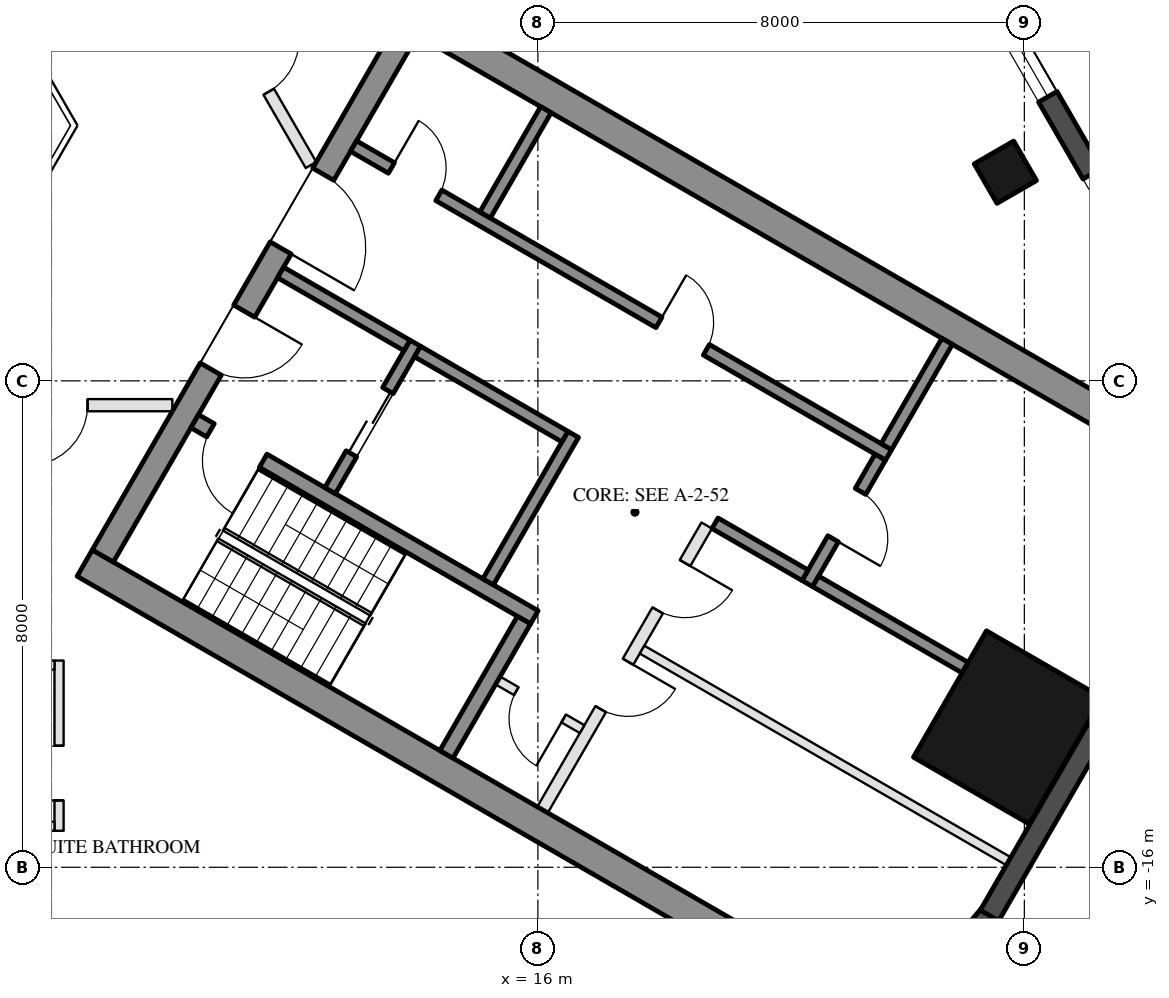
"""IFC4 building model, lengths in metres.
Left out: names, types, materials, properties, quantities, classifications, styles, units other than length and angle.
Written with IfcOpenShell. Run it as: python <this file> out.ifc"""

import sys

from ifc_helpers import new_model, si_unit, direction, frame, frame_2d, origin, origin_2d, place, context, subcontext, project, spatial, rectangle, hollow_rectangle, extrude, element, fill, save


model = new_model("IFC4")
c1 = context("Model", 3, precision=1e-05, world=origin(), true_north=direction((0.0, 1.0)))
c2 = subcontext(c1, "Body", "Model", "MODEL_VIEW")
j1 = project(units=[si_unit("LENGTHUNIT", "METRE"), si_unit("PLANEANGLEUNIT", "RADIAN")], contexts=[c1])
p1 = place(None, origin())
s1 = spatial("IfcSite", under=j1, at=p1, CompositionType="ELEMENT")
p2 = place(p1, origin())
s2 = spatial("IfcBuilding", under=s1, at=p2, CompositionType="ELEMENT")
p3 = place(p2, frame((0.0, 0.0, 224.3)))
s3 = spatial("IfcBuildingStorey", under=s2, at=p3, CompositionType="ELEMENT", Elevation=224.3)
p4 = place(p3, frame((23.688, -4.568, 0.0), z_axis=(0.0, 0.0, 1.0), x_axis=(-0.5, 0.866025403784, 0.0)))
e1 = element("IfcColumn", 1, at=p4, inside=s3, PredefinedType="COLUMN", context=c2, shape_type="SweptSolid", body=[
    extrude(hollow_rectangle(XDim=0.75, YDim=0.75, WallThickness=0.035, at=origin_2d()), origin(), (0.0, 0.0, 1.0), 3.7),
])
p5 = place(p3, frame((23.729, -13.7, 0.0), z_axis=(0.0, 0.0, 1.0), x_axis=(0.5, 0.866025403784, 0.0)))
e2 = element("IfcColumn", 2, at=p5, inside=s3, PredefinedType="COLUMN", context=c2, shape_type="SweptSolid", body=[
    extrude(hollow_rectangle(XDim=2.4, YDim=2.2, WallThickness=0.06, at=origin_2d()), origin(), (0.0, 0.0, 1.0), 3.7),
])
p6 = place(p3, frame((22.217, -18.231, 0.0), z_axis=(0.0, 0.0, 1.0), x_axis=(0.642733291068, 0.76609001857, 0.0)))
e3 = element("IfcWall", 3, at=p6, inside=s3, PredefinedType="SOLIDWALL", context=c2, shape_type="SweptSolid", body=[
    extrude(rectangle(XDim=1.91, YDim=0.35, at=frame_2d((0.955, 0.0))), origin(), (0.0, 0.0, 1.0), 3.55),
])
p7 = place(p3, frame((23.427, -16.792, 0.0), z_axis=(0.0, 0.0, 1.0), x_axis=(0.500018773155, 0.866014564827, 0.0)))
e4 = element("IfcWall", 4, at=p7, inside=s3, PredefinedType="SOLIDWALL", context=c2, shape_type="SweptSolid", body=[
    extrude(rectangle(XDim=5.658, YDim=0.35, at=frame_2d((2.829, 0.0))), origin(), (0.0, 0.0, 1.0), 3.55),
])
p8 = place(p3, frame((26.257, -6.567, 0.0), z_axis=(0.0, 0.0, 1.0), x_axis=(-0.500023526245, 0.866011820475, 0.0)))
e5 = element("IfcWall", 5, at=p8, inside=s3, PredefinedType="SOLIDWALL", context=c2, shape_type="SweptSolid", body=[
    extrude(rectangle(XDim=11.816, YDim=0.35, at=frame_2d((5.908, 0.0))), origin(), (0.0, 0.0, 1.0), 3.55),
])
p9 = place(p8, frame((0.38, 0.0, 0.3)))
e6 = element("IfcOpeningElement", 6, at=p9, cuts=e5, PredefinedType="OPENING", context=c2, shape_type="SweptSolid", body=[
    extrude(rectangle(XDim=1.9, YDim=2.65, at=frame_2d((0.95, 1.325))), frame((0.0, 0.185, 0.0), z_axis=(0.0, -1.0, 0.0), x_axis=(1.0, 0.0, 0.0)), (0.0, 0.0, 1.0), 0.37),
])
p10 = place(p8, frame((7.791, 0.0, 0.0)))
e7 = element("IfcOpeningElement", 7, at=p10, cuts=e5, PredefinedType="OPENING", context=c2, shape_type="SweptSolid", body=[
    extrude(rectangle(XDim=2.4, YDim=2.4, at=frame_2d((1.2, 1.2))), frame((0.0, 0.185, 0.0), z_axis=(0.0, -1.0, 0.0), x_axis=(1.0, 0.0, 0.0)), (0.0, 0.0, 1.0), 0.37),
])
p11 = place(p8, frame((3.741, 0.0, 0.3)))
e8 = element("IfcOpeningElement", 8, at=p11, cuts=e5, PredefinedType="OPENING", context=c2, shape_type="SweptSolid", body=[
    extrude(rectangle(XDim=1.7, YDim=2.65, at=frame_2d((0.85, 1.325))), frame((0.0, 0.185, 0.0), z_axis=(0.0, -1.0, 0.0), x_axis=(1.0, 0.0, 0.0)), (0.0, 0.0, 1.0), 0.37),
])
p12 = place(p8, frame((5.741, 0.0, 0.3)))
e9 = element("IfcOpeningElement", 9, at=p12, cuts=e5, PredefinedType="OPENING", context=c2, shape_type="SweptSolid", body=[
    extrude(rectangle(XDim=1.7, YDim=2.65, at=frame_2d((0.85, 1.325))), frame((0.0, 0.185, 0.0), z_axis=(0.0, -1.0, 0.0), x_axis=(1.0, 0.0, 0.0)), (0.0, 0.0, 1.0), 0.37),
])
for number, where, z_axis, x_axis in (
    (10, (8.547, -10.997, 0.0), (0.0, 0.0, 1.0), (0.866, -0.5, 0.0)),
    (11, (13.797, -1.903, 0.0), (0.0, 0.0, 1.0), (0.866, -0.5, 0.0)),
):
    element("IfcWall", number, at=place(p3, frame(where, z_axis=z_axis, x_axis=x_axis)), inside=s3, PredefinedType="SHEAR", context=c2, shape_type="SweptSolid", body=[
        extrude(rectangle(XDim=14.837, YDim=0.5, at=frame_2d((7.418, 0.0))), origin(), (0.0, 0.0, 1.0), 3.5),
    ])
p13 = place(p3, frame((8.845, -10.88, 0.0), z_axis=(0.0, 0.0, 1.0), x_axis=(0.500004234368, 0.866022959057, 0.0)))
e12 = element("IfcWall", 12, at=p13, inside=s3, PredefinedType="SHEAR", context=c2, shape_type="SweptSolid", body=[
    extrude(rectangle(XDim=10.0, YDim=0.4, at=frame_2d((5.0, 0.0))), origin(), (0.0, 0.0, 1.0), 3.5),
])
p14 = place(p13, frame((3.55, 0.0, 0.0)))
e13 = element("IfcOpeningElement", 13, at=p14, cuts=e12, PredefinedType="OPENING", context=c2, shape_type="SweptSolid", body=[
    extrude(rectangle(XDim=1.1, YDim=2.1, at=frame_2d((0.55, 1.05))), frame((0.0, 0.21, 0.0), z_axis=(0.0, -1.0, 0.0), x_axis=(1.0, 0.0, 0.0)), (0.0, 0.0, 1.0), 0.42),
])
p15 = place(p13, frame((5.85, 0.0, 0.0)))
e14 = element("IfcOpeningElement", 14, at=p15, cuts=e12, PredefinedType="OPENING", context=c2, shape_type="SweptSolid", body=[
    extrude(rectangle(XDim=1.4, YDim=2.1, at=frame_2d((0.7, 1.05))), frame((0.0, 0.21, 0.0), z_axis=(0.0, -1.0, 0.0), x_axis=(1.0, 0.0, 0.0)), (0.0, 0.0, 1.0), 0.42),
])
p16 = place(p3, frame((10.356, -8.664, 0.0), z_axis=(0.0, 0.0, 1.0), x_axis=(0.866028629588, -0.499994412703, 0.0)))
e15 = element("IfcWall", 15, at=p16, inside=s3, PredefinedType="SHEAR", context=c2, shape_type="SweptSolid", body=[
    extrude(rectangle(XDim=6.45, YDim=0.25, at=frame_2d((3.225, 0.0))), origin(), (0.0, 0.0, 1.0), 3.5),
])
p17 = place(p16, frame((0.3, 0.0, 0.0)))
e16 = element("IfcOpeningElement", 16, at=p17, cuts=e15, PredefinedType="OPENING", context=c2, shape_type="SweptSolid", body=[
    extrude(rectangle(XDim=1.0, YDim=2.1, at=frame_2d((0.5, 1.05))), frame((0.0, 0.135, 0.0), z_axis=(0.0, -1.0, 0.0), x_axis=(1.0, 0.0, 0.0)), (0.0, 0.0, 1.0), 0.27),
])
p18 = place(p3, frame((14.496, -14.143, 0.0), z_axis=(0.0, 0.0, 1.0), x_axis=(0.500062241894, 0.865989465428, 0.0)))
e17 = element("IfcWall", 17, at=p18, inside=s3, PredefinedType="SHEAR", context=c2, shape_type="SweptSolid", body=[
    extrude(rectangle(XDim=2.55, YDim=0.25, at=frame_2d((1.275, 0.0))), origin(), (0.0, 0.0, 1.0), 3.5),
])
p19 = place(p3, frame((15.181, -11.305, 0.0), z_axis=(0.0, 0.0, 1.0), x_axis=(0.49994636267, 0.866056369097, 0.0)))
e18 = element("IfcWall", 18, at=p19, inside=s3, PredefinedType="SHEAR", context=c2, shape_type="SweptSolid", body=[
    extrude(rectangle(XDim=2.8, YDim=0.2, at=frame_2d((1.4, 0.0))), origin(), (0.0, 0.0, 1.0), 3.5),
])
p20 = place(p3, frame((12.583, -9.805, 0.0), z_axis=(0.0, 0.0, 1.0), x_axis=(0.49994636267, 0.866056369097, 0.0)))
e19 = element("IfcWall", 19, at=p20, inside=s3, PredefinedType="SHEAR", context=c2, shape_type="SweptSolid", body=[
    extrude(rectangle(XDim=2.8, YDim=0.2, at=frame_2d((1.4, 0.0))), origin(), (0.0, 0.0, 1.0), 3.5),
])
p21 = place(p20, frame((0.7, 0.0, 0.0)))
e20 = element("IfcOpeningElement", 20, at=p21, cuts=e19, PredefinedType="OPENING", context=c2, shape_type="SweptSolid", body=[
    extrude(rectangle(XDim=1.2, YDim=2.1, at=frame_2d((0.6, 1.05))), frame((0.0, 0.11, 0.0), z_axis=(0.0, -1.0, 0.0), x_axis=(1.0, 0.0, 0.0)), (0.0, 0.0, 1.0), 0.22),
])
p22 = place(p3, frame((11.768, -6.217, 0.0), z_axis=(0.0, 0.0, 1.0), x_axis=(0.866050077142, -0.499957262057, 0.0)))
e21 = element("IfcWall", 21, at=p22, inside=s3, PredefinedType="SHEAR", context=c2, shape_type="SweptSolid", body=[
    extrude(rectangle(XDim=2.4, YDim=0.2, at=frame_2d((1.2, 0.0))), origin(), (0.0, 0.0, 1.0), 3.5),
])
p23 = place(p3, frame((14.02, -7.517, 0.0), z_axis=(0.0, 0.0, 1.0), x_axis=(0.866034573852, -0.49998411664, 0.0)))
e22 = element("IfcWall", 22, at=p23, inside=s3, PredefinedType="SHEAR", context=c2, shape_type="SweptSolid", body=[
    extrude(rectangle(XDim=2.8, YDim=0.2, at=frame_2d((1.4, 0.0))), origin(), (0.0, 0.0, 1.0), 3.5),
])
p24 = place(p3, frame((12.968, -4.138, 0.0), z_axis=(0.0, 0.0, 1.0), x_axis=(0.866028328073, -0.49999493495, 0.0)))
e23 = element("IfcWall", 23, at=p24, inside=s3, PredefinedType="SHEAR", context=c2, shape_type="SweptSolid", body=[
    extrude(rectangle(XDim=10.16, YDim=0.2, at=frame_2d((5.08, 0.0))), origin(), (0.0, 0.0, 1.0), 3.5),
])
p25 = place(p24, frame((0.72, 0.0, 0.0)))
e24 = element("IfcOpeningElement", 24, at=p25, cuts=e23, PredefinedType="OPENING", context=c2, shape_type="SweptSolid", body=[
    extrude(rectangle(XDim=0.9, YDim=2.1, at=frame_2d((0.45, 1.05))), frame((0.0, 0.11, 0.0), z_axis=(0.0, -1.0, 0.0), x_axis=(1.0, 0.0, 0.0)), (0.0, 0.0, 1.0), 0.22),
])
p26 = place(p24, frame((5.8, 0.0, 0.0)))
e25 = element("IfcOpeningElement", 25, at=p26, cuts=e23, PredefinedType="OPENING", context=c2, shape_type="SweptSolid", body=[
    extrude(rectangle(XDim=0.9, YDim=2.1, at=frame_2d((0.45, 1.05))), frame((0.0, 0.11, 0.0), z_axis=(0.0, -1.0, 0.0), x_axis=(1.0, 0.0, 0.0)), (0.0, 0.0, 1.0), 0.22),
])
p27 = place(p3, frame((20.43, -11.333, 0.0), z_axis=(0.0, 0.0, 1.0), x_axis=(0.500001309137, 0.866024647952, 0.0)))
e26 = element("IfcWall", 26, at=p27, inside=s3, PredefinedType="SHEAR", context=c2, shape_type="SweptSolid", body=[
    extrude(rectangle(XDim=2.4, YDim=0.2, at=frame_2d((1.2, 0.0))), origin(), (0.0, 0.0, 1.0), 3.5),
])
p28 = place(p27, frame((0.85, 0.0, 0.0)))
e27 = element("IfcOpeningElement", 27, at=p28, cuts=e26, PredefinedType="OPENING", context=c2, shape_type="SweptSolid", body=[
    extrude(rectangle(XDim=0.9, YDim=2.1, at=frame_2d((0.45, 1.05))), frame((0.0, 0.11, 0.0), z_axis=(0.0, -1.0, 0.0), x_axis=(1.0, 0.0, 0.0)), (0.0, 0.0, 1.0), 0.22),
])
p29 = place(p3, frame((18.913, -10.342, 0.0), z_axis=(0.0, 0.0, 1.0), x_axis=(0.866038183914, -0.499977863513, 0.0)))
e28 = element("IfcWall", 28, at=p29, inside=s3, PredefinedType="SHEAR", context=c2, shape_type="SweptSolid", body=[
    extrude(rectangle(XDim=1.71, YDim=0.2, at=frame_2d((0.855, 0.0))), origin(), (0.0, 0.0, 1.0), 3.5),
])
for number, where, z_axis, x_axis in (
    (29, (15.131, -5.272, 0.0), (0.0, 0.0, 1.0), (0.5, 0.866, 0.0)),
    (30, (21.73, -9.082, 0.0), (0.0, 0.0, 1.0), (0.5, 0.866, 0.0)),
):
    element("IfcWall", number, at=place(p3, frame(where, z_axis=z_axis, x_axis=x_axis)), inside=s3, PredefinedType="SHEAR", context=c2, shape_type="SweptSolid", body=[
        extrude(rectangle(XDim=2.0, YDim=0.2, at=frame_2d((1.0, 0.0))), origin(), (0.0, 0.0, 1.0), 3.5),
    ])
p30 = place(p3, frame((20.567, -11.297, 0.0), z_axis=(0.0, 0.0, 1.0), x_axis=(0.866055327414, -0.49994816717, 0.0)))
e31 = element("IfcWall", 31, at=p30, inside=s3, PredefinedType="SHEAR", context=c2, shape_type="SweptSolid", body=[
    extrude(rectangle(XDim=2.84, YDim=0.2, at=frame_2d((1.42, 0.0))), origin(), (0.0, 0.0, 1.0), 3.5),
])
p31 = place(p3, frame((16.076, -15.055, 0.0), z_axis=(0.0, 0.0, 1.0), x_axis=(0.499995103361, 0.866028230842, 0.0)))
e32 = element("IfcWall", 32, at=p31, inside=s3, PredefinedType="PARTITIONING", context=c2, shape_type="SweptSolid", body=[
    extrude(rectangle(XDim=5.4, YDim=0.2, at=frame_2d((2.7, 0.0))), origin(), (0.0, 0.0, 1.0), 3.5),
])
p32 = place(p31, frame((1.913, 0.0, 0.0)))
e33 = element("IfcOpeningElement", 33, at=p32, cuts=e32, PredefinedType="OPENING", context=c2, shape_type="SweptSolid", body=[
    extrude(rectangle(XDim=0.9, YDim=2.1, at=frame_2d((0.45, 1.05))), frame((0.0, 0.11, 0.0), z_axis=(0.0, -1.0, 0.0), x_axis=(1.0, 0.0, 0.0)), (0.0, 0.0, 1.0), 0.22),
])
p33 = place(p31, frame((3.788, 0.0, 0.0)))
e34 = element("IfcOpeningElement", 34, at=p33, cuts=e32, PredefinedType="OPENING", context=c2, shape_type="SweptSolid", body=[
    extrude(rectangle(XDim=0.9, YDim=2.1, at=frame_2d((0.45, 1.05))), frame((0.0, 0.11, 0.0), z_axis=(0.0, -1.0, 0.0), x_axis=(1.0, 0.0, 0.0)), (0.0, 0.0, 1.0), 0.22),
])
p34 = place(p3, frame((15.342, -12.928, 0.0), z_axis=(0.0, 0.0, 1.0), x_axis=(0.865989903783, -0.500061482766, 0.0)))
e35 = element("IfcWall", 35, at=p34, inside=s3, PredefinedType="PARTITIONING", context=c2, shape_type="SweptSolid", body=[
    extrude(rectangle(XDim=1.6, YDim=0.15, at=frame_2d((0.8, 0.0))), origin(), (0.0, 0.0, 1.0), 3.5),
])
p35 = place(p34, frame((0.35, 0.0, 0.0)))
e36 = element("IfcOpeningElement", 36, at=p35, cuts=e35, PredefinedType="OPENING", context=c2, shape_type="SweptSolid", body=[
    extrude(rectangle(XDim=0.9, YDim=2.1, at=frame_2d((0.45, 1.05))), frame((0.0, 0.085, 0.0), z_axis=(0.0, -1.0, 0.0), x_axis=(1.0, 0.0, 0.0)), (0.0, 0.0, 1.0), 0.17),
])
p36 = place(p3, frame((17.713, -12.42, 0.0), z_axis=(0.0, 0.0, 1.0), x_axis=(0.866016523273, -0.500015381182, 0.0)))
e37 = element("IfcWall", 37, at=p36, inside=s3, PredefinedType="PARTITIONING", context=c2, shape_type="SweptSolid", body=[
    extrude(rectangle(XDim=6.95, YDim=0.15, at=frame_2d((3.475, 0.0))), origin(), (0.0, 0.0, 1.0), 3.5),
])
p37 = place(p3, frame((9.988, -8.4, 0.0), z_axis=(0.0, 0.0, 1.0), x_axis=(-1.0, 0.0, 0.0)))
e38 = element("IfcWall", 38, at=p37, inside=s3, PredefinedType="PARTITIONING", context=c2, shape_type="SweptSolid", body=[
    extrude(rectangle(XDim=3.788, YDim=0.2, at=frame_2d((1.894, 0.0))), origin(), (0.0, 0.0, 1.0), 2.95),
])
p38 = place(p37, frame((1.394, 0.0, 0.0)))
e39 = element("IfcOpeningElement", 39, at=p38, cuts=e38, PredefinedType="OPENING", context=c2, shape_type="SweptSolid", body=[
    extrude(rectangle(XDim=1.0, YDim=2.1, at=frame_2d((0.5, 1.05))), frame((0.0, 0.11, 0.0), z_axis=(0.0, -1.0, 0.0), x_axis=(1.0, 0.0, 0.0)), (0.0, 0.0, 1.0), 0.22),
])
p39 = place(p3, frame((8.125, -15.4, 0.0), z_axis=(0.0, 0.0, 1.0), x_axis=(0.0, 1.0, 0.0)))
e40 = element("IfcWall", 40, at=p39, inside=s3, PredefinedType="PARTITIONING", context=c2, shape_type="SweptSolid", body=[
    extrude(rectangle(XDim=2.8, YDim=0.15, at=frame_2d((1.4, 0.0))), origin(), (0.0, 0.0, 1.0), 3.55),
])
p40 = place(p39, frame((0.5, 0.0, 0.0)))
e41 = element("IfcOpeningElement", 41, at=p40, cuts=e40, PredefinedType="OPENING", context=c2, shape_type="SweptSolid", body=[
    extrude(rectangle(XDim=0.9, YDim=2.1, at=frame_2d((0.45, 1.05))), frame((0.0, 0.085, 0.0), z_axis=(0.0, -1.0, 0.0), x_axis=(1.0, 0.0, 0.0)), (0.0, 0.0, 1.0), 0.17),
])
for number, where, z_axis, x_axis in (
    (42, (6.2, -15.325, 0.0), (0.0, 0.0, 1.0), (1.0, 0.0, 0.0)),
    (43, (6.2, -12.675, 0.0), (0.0, 0.0, 1.0), (1.0, 0.0, 0.0)),
):
    element("IfcWall", number, at=place(p3, frame(where, z_axis=z_axis, x_axis=x_axis)), inside=s3, PredefinedType="PARTITIONING", context=c2, shape_type="SweptSolid", body=[
        extrude(rectangle(XDim=1.85, YDim=0.15, at=frame_2d((0.925, 0.0))), origin(), (0.0, 0.0, 1.0), 2.95),
    ])
p41 = place(p3, frame((10.377, -1.174, 0.0), z_axis=(0.0, 0.0, 1.0), x_axis=(0.500033471514, -0.866006078134, 0.0)))
e44 = element("IfcWall", 44, at=p41, inside=s3, PredefinedType="PARTITIONING", context=c2, shape_type="SweptSolid", body=[
    extrude(rectangle(XDim=3.782, YDim=0.2, at=frame_2d((1.891, 0.0))), origin(), (0.0, 0.0, 1.0), 2.95),
])
p42 = place(p41, frame((1.391, 0.0, 0.0)))
e45 = element("IfcOpeningElement", 45, at=p42, cuts=e44, PredefinedType="OPENING", context=c2, shape_type="SweptSolid", body=[
    extrude(rectangle(XDim=1.0, YDim=2.1, at=frame_2d((0.5, 1.05))), frame((0.0, 0.11, 0.0), z_axis=(0.0, -1.0, 0.0), x_axis=(1.0, 0.0, 0.0)), (0.0, 0.0, 1.0), 0.22),
])
p43 = place(p11, origin())
e46 = element("IfcWindow", 46, at=p43, inside=s3, PartitioningType="SINGLE_PANEL", PredefinedType="WINDOW", context=c2, shape_type="SweptSolid", body=[
    extrude(rectangle(XDim=1.7, YDim=2.65, at=frame_2d((0.85, 1.325))), frame((0.0, 0.03, 0.0), z_axis=(0.0, -1.0, 0.0), x_axis=(1.0, 0.0, 0.0)), (0.0, 0.0, 1.0), 0.06),
])
fill(e8, e46)
p44 = place(p21, origin())
e47 = element("IfcDoor", 47, at=p44, inside=s3, OperationType="DOUBLE_DOOR_SLIDING", PredefinedType="DOOR", context=c2, shape_type="SweptSolid", body=[
    extrude(rectangle(XDim=1.2, YDim=2.1, at=frame_2d((0.6, 1.05))), frame((0.0, 0.025, 0.0), z_axis=(0.0, -1.0, 0.0), x_axis=(1.0, 0.0, 0.0)), (0.0, 0.0, 1.0), 0.05),
])
fill(e20, e47)
p45 = place(p35, frame((0.9, 0.0, 0.0), z_axis=(0.0, 0.0, 1.0), x_axis=(-1.0, 0.0, 0.0)))
e48 = element("IfcDoor", 48, at=p45, inside=s3, OperationType="SINGLE_SWING_LEFT", PredefinedType="DOOR", context=c2, shape_type="SweptSolid", body=[
    extrude(rectangle(XDim=0.9, YDim=2.1, at=frame_2d((0.45, 1.05))), frame((0.0, 0.025, 0.0), z_axis=(0.0, -1.0, 0.0), x_axis=(1.0, 0.0, 0.0)), (0.0, 0.0, 1.0), 0.05),
])
fill(e36, e48)
p46 = place(p25, origin())
e49 = element("IfcDoor", 49, at=p46, inside=s3, OperationType="SINGLE_SWING_LEFT", PredefinedType="DOOR", context=c2, shape_type="SweptSolid", body=[
    extrude(rectangle(XDim=0.9, YDim=2.1, at=frame_2d((0.45, 1.05))), frame((0.0, 0.025, 0.0), z_axis=(0.0, -1.0, 0.0), x_axis=(1.0, 0.0, 0.0)), (0.0, 0.0, 1.0), 0.05),
])
fill(e24, e49)
p47 = place(p26, origin())
e50 = element("IfcDoor", 50, at=p47, inside=s3, OperationType="SINGLE_SWING_LEFT", PredefinedType="DOOR", context=c2, shape_type="SweptSolid", body=[
    extrude(rectangle(XDim=0.9, YDim=2.1, at=frame_2d((0.45, 1.05))), frame((0.0, 0.025, 0.0), z_axis=(0.0, -1.0, 0.0), x_axis=(1.0, 0.0, 0.0)), (0.0, 0.0, 1.0), 0.05),
])
fill(e25, e50)
p48 = place(p28, frame((0.9, 0.0, 0.0), z_axis=(0.0, 0.0, 1.0), x_axis=(-1.0, 0.0, 0.0)))
e51 = element("IfcDoor", 51, at=p48, inside=s3, OperationType="SINGLE_SWING_RIGHT", PredefinedType="DOOR", context=c2, shape_type="SweptSolid", body=[
    extrude(rectangle(XDim=0.9, YDim=2.1, at=frame_2d((0.45, 1.05))), frame((0.0, 0.025, 0.0), z_axis=(0.0, -1.0, 0.0), x_axis=(1.0, 0.0, 0.0)), (0.0, 0.0, 1.0), 0.05),
])
fill(e27, e51)
p49 = place(p32, frame((0.9, 0.0, 0.0), z_axis=(0.0, 0.0, 1.0), x_axis=(-1.0, 0.0, 0.0)))
e52 = element("IfcDoor", 52, at=p49, inside=s3, OperationType="SINGLE_SWING_LEFT", PredefinedType="DOOR", context=c2, shape_type="SweptSolid", body=[
    extrude(rectangle(XDim=0.9, YDim=2.1, at=frame_2d((0.45, 1.05))), frame((0.0, 0.025, 0.0), z_axis=(0.0, -1.0, 0.0), x_axis=(1.0, 0.0, 0.0)), (0.0, 0.0, 1.0), 0.05),
])
fill(e33, e52)
p50 = place(p33, frame((0.9, 0.0, 0.0), z_axis=(0.0, 0.0, 1.0), x_axis=(-1.0, 0.0, 0.0)))
e53 = element("IfcDoor", 53, at=p50, inside=s3, OperationType="SINGLE_SWING_LEFT", PredefinedType="DOOR", context=c2, shape_type="SweptSolid", body=[
    extrude(rectangle(XDim=0.9, YDim=2.1, at=frame_2d((0.45, 1.05))), frame((0.0, 0.025, 0.0), z_axis=(0.0, -1.0, 0.0), x_axis=(1.0, 0.0, 0.0)), (0.0, 0.0, 1.0), 0.05),
])
fill(e34, e53)
p51 = place(p14, frame((1.1, 0.0, 0.0), z_axis=(0.0, 0.0, 1.0), x_axis=(-1.0, 0.0, 0.0)))
e54 = element("IfcDoor", 54, at=p51, inside=s3, OperationType="SINGLE_SWING_LEFT", PredefinedType="DOOR", context=c2, shape_type="SweptSolid", body=[
    extrude(rectangle(XDim=1.1, YDim=2.1, at=frame_2d((0.55, 1.05))), frame((0.0, 0.025, 0.0), z_axis=(0.0, -1.0, 0.0), x_axis=(1.0, 0.0, 0.0)), (0.0, 0.0, 1.0), 0.05),
])
fill(e13, e54)
p52 = place(p15, frame((1.4, 0.0, 0.0), z_axis=(0.0, 0.0, 1.0), x_axis=(-1.0, 0.0, 0.0)))
e55 = element("IfcDoor", 55, at=p52, inside=s3, OperationType="DOUBLE_DOOR_SINGLE_SWING", PredefinedType="DOOR", context=c2, shape_type="SweptSolid", body=[
    extrude(rectangle(XDim=1.4, YDim=2.1, at=frame_2d((0.7, 1.05))), frame((0.0, 0.025, 0.0), z_axis=(0.0, -1.0, 0.0), x_axis=(1.0, 0.0, 0.0)), (0.0, 0.0, 1.0), 0.05),
])
fill(e14, e55)
p53 = place(p17, frame((1.0, 0.0, 0.0), z_axis=(0.0, 0.0, 1.0), x_axis=(-1.0, 0.0, 0.0)))
e56 = element("IfcDoor", 56, at=p53, inside=s3, OperationType="SINGLE_SWING_LEFT", PredefinedType="DOOR", context=c2, shape_type="SweptSolid", body=[
    extrude(rectangle(XDim=1.0, YDim=2.1, at=frame_2d((0.5, 1.05))), frame((0.0, 0.025, 0.0), z_axis=(0.0, -1.0, 0.0), x_axis=(1.0, 0.0, 0.0)), (0.0, 0.0, 1.0), 0.05),
])
fill(e16, e56)
p54 = place(p40, origin())
e57 = element("IfcDoor", 57, at=p54, inside=s3, OperationType="SINGLE_SWING_LEFT", PredefinedType="DOOR", context=c2, shape_type="SweptSolid", body=[
    extrude(rectangle(XDim=0.9, YDim=2.1, at=frame_2d((0.45, 1.05))), frame((0.0, 0.025, 0.0), z_axis=(0.0, -1.0, 0.0), x_axis=(1.0, 0.0, 0.0)), (0.0, 0.0, 1.0), 0.05),
])
fill(e41, e57)
p55 = place(p38, origin())
e58 = element("IfcDoor", 58, at=p55, inside=s3, OperationType="SINGLE_SWING_RIGHT", PredefinedType="DOOR", context=c2, shape_type="SweptSolid", body=[
    extrude(rectangle(XDim=1.0, YDim=2.1, at=frame_2d((0.5, 1.05))), frame((0.0, 0.025, 0.0), z_axis=(0.0, -1.0, 0.0), x_axis=(1.0, 0.0, 0.0)), (0.0, 0.0, 1.0), 0.05),
])
fill(e39, e58)
p56 = place(p42, origin())
e59 = element("IfcDoor", 59, at=p56, inside=s3, OperationType="SINGLE_SWING_LEFT", PredefinedType="DOOR", context=c2, shape_type="SweptSolid", body=[
    extrude(rectangle(XDim=1.0, YDim=2.1, at=frame_2d((0.5, 1.05))), frame((0.0, 0.025, 0.0), z_axis=(0.0, -1.0, 0.0), x_axis=(1.0, 0.0, 0.0)), (0.0, 0.0, 1.0), 0.05),
])
fill(e45, e59)
save(model, sys.argv[1])
